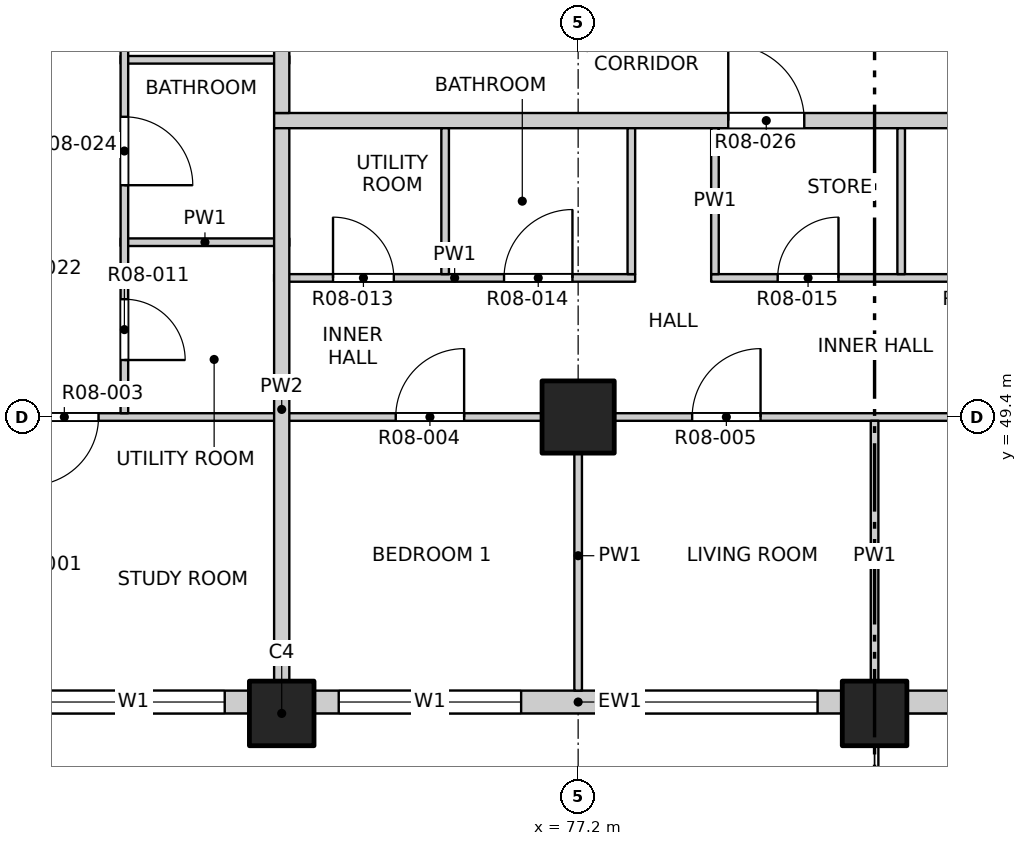
"""IFC4 building model, lengths in metres.
Left out: names, types, materials, properties, quantities, classifications, styles, units other than length and angle.
Written with IfcOpenShell. Run it as: python <this file> out.ifc"""

import sys

from ifc_helpers import new_model, si_unit, direction, frame, frame_2d, origin, origin_2d, place, context, subcontext, project, spatial, rectangle, extrude, element, fill, save


model = new_model("IFC4")
c1 = context("Model", 3, precision=1e-05, world=origin(), true_north=direction((0.0, 1.0)))
c2 = subcontext(c1, "Body", "Model", "MODEL_VIEW")
j1 = project(units=[si_unit("LENGTHUNIT", "METRE"), si_unit("PLANEANGLEUNIT", "RADIAN")], contexts=[c1])
p1 = place(None, origin())
s1 = spatial("IfcSite", under=j1, at=p1, CompositionType="ELEMENT")
p2 = place(p1, origin())
s2 = spatial("IfcBuilding", under=s1, at=p2, CompositionType="ELEMENT")
p3 = place(p2, frame((0.0, 0.0, 99.9)))
s3 = spatial("IfcBuildingStorey", under=s2, at=p3, CompositionType="ELEMENT", Elevation=99.9)
for number, where, z_axis, x_axis in (
    (1, (73.3, 45.5, -0.3), (0.0, 0.0, 1.0), (1.0, 0.0, 0.0)),
    (2, (81.1, 45.5, -0.3), (0.0, 0.0, 1.0), (1.0, 0.0, 0.0)),
):
    element("IfcColumn", number, at=place(p3, frame(where, z_axis=z_axis, x_axis=x_axis)), inside=s3, PredefinedType="COLUMN", context=c2, shape_type="SweptSolid", body=[
        extrude(rectangle(XDim=0.85, YDim=0.85, at=origin_2d()), origin(), (0.0, 0.0, 1.0), 3.45),
    ])
p4 = place(p3, frame((77.2, 49.4, -0.3), z_axis=(0.0, 0.0, 1.0), x_axis=(1.0, 0.0, 0.0)))
e3 = element("IfcColumn", 3, at=p4, inside=s3, PredefinedType="COLUMN", context=c2, shape_type="SweptSolid", body=[
    extrude(rectangle(XDim=0.95, YDim=0.95, at=origin_2d()), origin(), (0.0, 0.0, 1.0), 3.45),
])
p5 = place(p3, frame((69.4, 45.65, 0.0), z_axis=(0.0, 0.0, 1.0), x_axis=(1.0, 0.0, 0.0)))
e4 = element("IfcWall", 4, at=p5, inside=s3, PredefinedType="SOLIDWALL", context=c2, shape_type="SweptSolid", body=[
    extrude(rectangle(XDim=3.475, YDim=0.3, at=frame_2d((1.738, 0.0))), origin(), (0.0, 0.0, 1.0), 2.7),
])
p6 = place(p5, frame((0.75, 0.0, 0.9)))
e5 = element("IfcOpeningElement", 5, at=p6, cuts=e4, PredefinedType="OPENING", context=c2, shape_type="SweptSolid", body=[
    extrude(rectangle(XDim=2.4, YDim=1.8, at=frame_2d((1.2, 0.9))), frame((0.0, 0.16, 0.0), z_axis=(0.0, -1.0, 0.0), x_axis=(1.0, 0.0, 0.0)), (0.0, 0.0, 1.0), 0.32),
])
p7 = place(p3, frame((73.725, 45.65, 0.0), z_axis=(0.0, 0.0, 1.0), x_axis=(1.0, 0.0, 0.0)))
e6 = element("IfcWall", 6, at=p7, inside=s3, PredefinedType="SOLIDWALL", context=c2, shape_type="SweptSolid", body=[
    extrude(rectangle(XDim=6.95, YDim=0.3, at=frame_2d((3.475, 0.0))), origin(), (0.0, 0.0, 1.0), 2.7),
])
p8 = place(p7, frame((0.325, 0.0, 0.9)))
e7 = element("IfcOpeningElement", 7, at=p8, cuts=e6, PredefinedType="OPENING", context=c2, shape_type="SweptSolid", body=[
    extrude(rectangle(XDim=2.4, YDim=1.8, at=frame_2d((1.2, 0.9))), frame((0.0, 0.16, 0.0), z_axis=(0.0, -1.0, 0.0), x_axis=(1.0, 0.0, 0.0)), (0.0, 0.0, 1.0), 0.32),
])
p9 = place(p7, frame((4.225, 0.0, 0.9)))
e8 = element("IfcOpeningElement", 8, at=p9, cuts=e6, PredefinedType="OPENING", context=c2, shape_type="SweptSolid", body=[
    extrude(rectangle(XDim=2.4, YDim=1.8, at=frame_2d((1.2, 0.9))), frame((0.0, 0.16, 0.0), z_axis=(0.0, -1.0, 0.0), x_axis=(1.0, 0.0, 0.0)), (0.0, 0.0, 1.0), 0.32),
])
p10 = place(p3, frame((81.525, 45.65, 0.0), z_axis=(0.0, 0.0, 1.0), x_axis=(1.0, 0.0, 0.0)))
e9 = element("IfcWall", 9, at=p10, inside=s3, PredefinedType="SOLIDWALL", context=c2, shape_type="SweptSolid", body=[
    extrude(rectangle(XDim=6.95, YDim=0.3, at=frame_2d((3.475, 0.0))), origin(), (0.0, 0.0, 1.0), 2.7),
])
p11 = place(p10, frame((0.625, 0.0, 0.0)))
e10 = element("IfcOpeningElement", 10, at=p11, cuts=e9, PredefinedType="OPENING", context=c2, shape_type="SweptSolid", body=[
    extrude(rectangle(XDim=1.8, YDim=2.4, at=frame_2d((0.9, 1.2))), frame((0.0, 0.16, 0.0), z_axis=(0.0, -1.0, 0.0), x_axis=(1.0, 0.0, 0.0)), (0.0, 0.0, 1.0), 0.32),
])
p12 = place(p10, frame((4.225, 0.0, 0.9)))
e11 = element("IfcOpeningElement", 11, at=p12, cuts=e9, PredefinedType="OPENING", context=c2, shape_type="SweptSolid", body=[
    extrude(rectangle(XDim=2.4, YDim=1.8, at=frame_2d((1.2, 0.9))), frame((0.0, 0.16, 0.0), z_axis=(0.0, -1.0, 0.0), x_axis=(1.0, 0.0, 0.0)), (0.0, 0.0, 1.0), 0.32),
])
p13 = place(p3, frame((65.8, 49.4, 0.0), z_axis=(0.0, 0.0, 1.0), x_axis=(1.0, 0.0, 0.0)))
e12 = element("IfcWall", 12, at=p13, inside=s3, PredefinedType="PARTITIONING", context=c2, shape_type="SweptSolid", body=[
    extrude(rectangle(XDim=38.4, YDim=0.1, at=frame_2d((19.2, 0.0))), origin(), (0.0, 0.0, 1.0), 3.15),
])
p14 = place(p13, frame((4.19, 0.0, 0.0)))
e13 = element("IfcOpeningElement", 13, at=p14, cuts=e12, PredefinedType="OPENING", context=c2, shape_type="SweptSolid", body=[
    extrude(rectangle(XDim=0.9, YDim=2.1, at=frame_2d((0.45, 1.05))), frame((0.0, 0.06, 0.0), z_axis=(0.0, -1.0, 0.0), x_axis=(1.0, 0.0, 0.0)), (0.0, 0.0, 1.0), 0.12),
])
p15 = place(p13, frame((9.0, 0.0, 0.0)))
e14 = element("IfcOpeningElement", 14, at=p15, cuts=e12, PredefinedType="OPENING", context=c2, shape_type="SweptSolid", body=[
    extrude(rectangle(XDim=0.9, YDim=2.1, at=frame_2d((0.45, 1.05))), frame((0.0, 0.06, 0.0), z_axis=(0.0, -1.0, 0.0), x_axis=(1.0, 0.0, 0.0)), (0.0, 0.0, 1.0), 0.12),
])
p16 = place(p13, frame((12.9, 0.0, 0.0)))
e15 = element("IfcOpeningElement", 15, at=p16, cuts=e12, PredefinedType="OPENING", context=c2, shape_type="SweptSolid", body=[
    extrude(rectangle(XDim=0.9, YDim=2.1, at=frame_2d((0.45, 1.05))), frame((0.0, 0.06, 0.0), z_axis=(0.0, -1.0, 0.0), x_axis=(1.0, 0.0, 0.0)), (0.0, 0.0, 1.0), 0.12),
])
p17 = place(p13, frame((16.8, 0.0, 0.0)))
e16 = element("IfcOpeningElement", 16, at=p17, cuts=e12, PredefinedType="OPENING", context=c2, shape_type="SweptSolid", body=[
    extrude(rectangle(XDim=0.9, YDim=2.1, at=frame_2d((0.45, 1.05))), frame((0.0, 0.06, 0.0), z_axis=(0.0, -1.0, 0.0), x_axis=(1.0, 0.0, 0.0)), (0.0, 0.0, 1.0), 0.12),
])
p18 = place(p13, frame((20.7, 0.0, 0.0)))
e17 = element("IfcOpeningElement", 17, at=p18, cuts=e12, PredefinedType="OPENING", context=c2, shape_type="SweptSolid", body=[
    extrude(rectangle(XDim=0.9, YDim=2.1, at=frame_2d((0.45, 1.05))), frame((0.0, 0.06, 0.0), z_axis=(0.0, -1.0, 0.0), x_axis=(1.0, 0.0, 0.0)), (0.0, 0.0, 1.0), 0.12),
])
p19 = place(p13, frame((24.6, 0.0, 0.0)))
e18 = element("IfcOpeningElement", 18, at=p19, cuts=e12, PredefinedType="OPENING", context=c2, shape_type="SweptSolid", body=[
    extrude(rectangle(XDim=0.9, YDim=2.1, at=frame_2d((0.45, 1.05))), frame((0.0, 0.06, 0.0), z_axis=(0.0, -1.0, 0.0), x_axis=(1.0, 0.0, 0.0)), (0.0, 0.0, 1.0), 0.12),
])
p20 = place(p13, frame((28.5, 0.0, 0.0)))
e19 = element("IfcOpeningElement", 19, at=p20, cuts=e12, PredefinedType="OPENING", context=c2, shape_type="SweptSolid", body=[
    extrude(rectangle(XDim=0.9, YDim=2.1, at=frame_2d((0.45, 1.05))), frame((0.0, 0.06, 0.0), z_axis=(0.0, -1.0, 0.0), x_axis=(1.0, 0.0, 0.0)), (0.0, 0.0, 1.0), 0.12),
])
p21 = place(p13, frame((33.31, 0.0, 0.0)))
e20 = element("IfcOpeningElement", 20, at=p21, cuts=e12, PredefinedType="OPENING", context=c2, shape_type="SweptSolid", body=[
    extrude(rectangle(XDim=0.9, YDim=2.1, at=frame_2d((0.45, 1.05))), frame((0.0, 0.06, 0.0), z_axis=(0.0, -1.0, 0.0), x_axis=(1.0, 0.0, 0.0)), (0.0, 0.0, 1.0), 0.12),
])
p22 = place(p3, frame((73.2, 51.23, 0.0), z_axis=(0.0, 0.0, 1.0), x_axis=(1.0, 0.0, 0.0)))
e21 = element("IfcWall", 21, at=p22, inside=s3, PredefinedType="PARTITIONING", context=c2, shape_type="SweptSolid", body=[
    extrude(rectangle(XDim=4.75, YDim=0.1, at=frame_2d((2.375, 0.0))), origin(), (0.0, 0.0, 1.0), 3.15),
])
p23 = place(p22, frame((0.775, 0.0, 0.0)))
e22 = element("IfcOpeningElement", 22, at=p23, cuts=e21, PredefinedType="OPENING", context=c2, shape_type="SweptSolid", body=[
    extrude(rectangle(XDim=0.8, YDim=2.1, at=frame_2d((0.4, 1.05))), frame((0.0, 0.06, 0.0), z_axis=(0.0, -1.0, 0.0), x_axis=(1.0, 0.0, 0.0)), (0.0, 0.0, 1.0), 0.12),
])
p24 = place(p22, frame((3.025, 0.0, 0.0)))
e23 = element("IfcOpeningElement", 23, at=p24, cuts=e21, PredefinedType="OPENING", context=c2, shape_type="SweptSolid", body=[
    extrude(rectangle(XDim=0.9, YDim=2.1, at=frame_2d((0.45, 1.05))), frame((0.0, 0.06, 0.0), z_axis=(0.0, -1.0, 0.0), x_axis=(1.0, 0.0, 0.0)), (0.0, 0.0, 1.0), 0.12),
])
p25 = place(p3, frame((78.95, 51.23, 0.0), z_axis=(0.0, 0.0, 1.0), x_axis=(1.0, 0.0, 0.0)))
e24 = element("IfcWall", 24, at=p25, inside=s3, PredefinedType="PARTITIONING", context=c2, shape_type="SweptSolid", body=[
    extrude(rectangle(XDim=11.1, YDim=0.1, at=frame_2d((5.55, 0.0))), origin(), (0.0, 0.0, 1.0), 3.15),
])
p26 = place(p25, frame((0.875, 0.0, 0.0)))
e25 = element("IfcOpeningElement", 25, at=p26, cuts=e24, PredefinedType="OPENING", context=c2, shape_type="SweptSolid", body=[
    extrude(rectangle(XDim=0.8, YDim=2.1, at=frame_2d((0.4, 1.05))), frame((0.0, 0.06, 0.0), z_axis=(0.0, -1.0, 0.0), x_axis=(1.0, 0.0, 0.0)), (0.0, 0.0, 1.0), 0.12),
])
p27 = place(p25, frame((3.325, 0.0, 0.0)))
e26 = element("IfcOpeningElement", 26, at=p27, cuts=e24, PredefinedType="OPENING", context=c2, shape_type="SweptSolid", body=[
    extrude(rectangle(XDim=0.8, YDim=2.1, at=frame_2d((0.4, 1.05))), frame((0.0, 0.06, 0.0), z_axis=(0.0, -1.0, 0.0), x_axis=(1.0, 0.0, 0.0)), (0.0, 0.0, 1.0), 0.12),
])
p28 = place(p25, frame((6.035, 0.0, 0.0)))
e27 = element("IfcOpeningElement", 27, at=p28, cuts=e24, PredefinedType="OPENING", context=c2, shape_type="SweptSolid", body=[
    extrude(rectangle(XDim=0.9, YDim=2.1, at=frame_2d((0.45, 1.05))), frame((0.0, 0.06, 0.0), z_axis=(0.0, -1.0, 0.0), x_axis=(1.0, 0.0, 0.0)), (0.0, 0.0, 1.0), 0.12),
])
p29 = place(p25, frame((8.535, 0.0, 0.0)))
e28 = element("IfcOpeningElement", 28, at=p29, cuts=e24, PredefinedType="OPENING", context=c2, shape_type="SweptSolid", body=[
    extrude(rectangle(XDim=0.9, YDim=2.1, at=frame_2d((0.45, 1.05))), frame((0.0, 0.06, 0.0), z_axis=(0.0, -1.0, 0.0), x_axis=(1.0, 0.0, 0.0)), (0.0, 0.0, 1.0), 0.12),
])
p30 = place(p25, frame((10.1, 0.0, 0.0)))
e29 = element("IfcOpeningElement", 29, at=p30, cuts=e24, PredefinedType="OPENING", context=c2, shape_type="SweptSolid", body=[
    extrude(rectangle(XDim=0.8, YDim=2.1, at=frame_2d((0.4, 1.05))), frame((0.0, 0.06, 0.0), z_axis=(0.0, -1.0, 0.0), x_axis=(1.0, 0.0, 0.0)), (0.0, 0.0, 1.0), 0.12),
])
p31 = place(p3, frame((71.18, 51.7, 0.0), z_axis=(0.0, 0.0, 1.0), x_axis=(1.0, 0.0, 0.0)))
e30 = element("IfcWall", 30, at=p31, inside=s3, PredefinedType="PARTITIONING", context=c2, shape_type="SweptSolid", body=[
    extrude(rectangle(XDim=2.22, YDim=0.1, at=frame_2d((1.11, 0.0))), origin(), (0.0, 0.0, 1.0), 3.15),
])
p32 = place(p3, frame((73.2, 53.3, 0.0), z_axis=(0.0, 0.0, 1.0), x_axis=(1.0, 0.0, 0.0)))
e31 = element("IfcWall", 31, at=p32, inside=s3, PredefinedType="PARTITIONING", context=c2, shape_type="SweptSolid", body=[
    extrude(rectangle(XDim=23.6, YDim=0.2, at=frame_2d((11.8, 0.0))), origin(), (0.0, 0.0, 1.0), 3.15),
])
p33 = place(p32, frame((5.975, 0.0, 0.0)))
e32 = element("IfcOpeningElement", 32, at=p33, cuts=e31, PredefinedType="OPENING", context=c2, shape_type="SweptSolid", body=[
    extrude(rectangle(XDim=1.0, YDim=2.1, at=frame_2d((0.5, 1.05))), frame((0.0, 0.11, 0.0), z_axis=(0.0, -1.0, 0.0), x_axis=(1.0, 0.0, 0.0)), (0.0, 0.0, 1.0), 0.22),
])
p34 = place(p32, frame((18.075, 0.0, 0.0)))
e33 = element("IfcOpeningElement", 33, at=p34, cuts=e31, PredefinedType="OPENING", context=c2, shape_type="SweptSolid", body=[
    extrude(rectangle(XDim=1.0, YDim=2.1, at=frame_2d((0.5, 1.05))), frame((0.0, 0.11, 0.0), z_axis=(0.0, -1.0, 0.0), x_axis=(1.0, 0.0, 0.0)), (0.0, 0.0, 1.0), 0.22),
])
p35 = place(p3, frame((71.18, 54.1, 0.0), z_axis=(0.0, 0.0, 1.0), x_axis=(1.0, 0.0, 0.0)))
e34 = element("IfcWall", 34, at=p35, inside=s3, PredefinedType="PARTITIONING", context=c2, shape_type="SweptSolid", body=[
    extrude(rectangle(XDim=2.22, YDim=0.1, at=frame_2d((1.11, 0.0))), origin(), (0.0, 0.0, 1.0), 3.15),
])
p36 = place(p3, frame((71.23, 49.45, 0.0), z_axis=(0.0, 0.0, 1.0), x_axis=(0.0, 1.0, 0.0)))
e35 = element("IfcWall", 35, at=p36, inside=s3, PredefinedType="PARTITIONING", context=c2, shape_type="SweptSolid", body=[
    extrude(rectangle(XDim=9.05, YDim=0.1, at=frame_2d((4.525, 0.0))), origin(), (0.0, 0.0, 1.0), 3.15),
])
p37 = place(p36, frame((0.7, 0.0, 0.0)))
e36 = element("IfcOpeningElement", 36, at=p37, cuts=e35, PredefinedType="OPENING", context=c2, shape_type="SweptSolid", body=[
    extrude(rectangle(XDim=0.8, YDim=2.1, at=frame_2d((0.4, 1.05))), frame((0.0, 0.06, 0.0), z_axis=(0.0, -1.0, 0.0), x_axis=(1.0, 0.0, 0.0)), (0.0, 0.0, 1.0), 0.12),
])
p38 = place(p36, frame((3.0, 0.0, 0.0)))
e37 = element("IfcOpeningElement", 37, at=p38, cuts=e35, PredefinedType="OPENING", context=c2, shape_type="SweptSolid", body=[
    extrude(rectangle(XDim=0.9, YDim=2.1, at=frame_2d((0.45, 1.05))), frame((0.0, 0.06, 0.0), z_axis=(0.0, -1.0, 0.0), x_axis=(1.0, 0.0, 0.0)), (0.0, 0.0, 1.0), 0.12),
])
p39 = place(p36, frame((5.575, 0.0, 0.0)))
e38 = element("IfcOpeningElement", 38, at=p39, cuts=e35, PredefinedType="OPENING", context=c2, shape_type="SweptSolid", body=[
    extrude(rectangle(XDim=0.8, YDim=2.1, at=frame_2d((0.4, 1.05))), frame((0.0, 0.06, 0.0), z_axis=(0.0, -1.0, 0.0), x_axis=(1.0, 0.0, 0.0)), (0.0, 0.0, 1.0), 0.12),
])
p40 = place(p36, frame((7.75, 0.0, 0.0)))
e39 = element("IfcOpeningElement", 39, at=p40, cuts=e35, PredefinedType="OPENING", context=c2, shape_type="SweptSolid", body=[
    extrude(rectangle(XDim=0.9, YDim=2.1, at=frame_2d((0.45, 1.05))), frame((0.0, 0.06, 0.0), z_axis=(0.0, -1.0, 0.0), x_axis=(1.0, 0.0, 0.0)), (0.0, 0.0, 1.0), 0.12),
])
p41 = place(p3, frame((73.3, 45.8, 0.0), z_axis=(0.0, 0.0, 1.0), x_axis=(0.0, 1.0, 0.0)))
e40 = element("IfcWall", 40, at=p41, inside=s3, PredefinedType="PARTITIONING", context=c2, shape_type="SweptSolid", body=[
    extrude(rectangle(XDim=7.4, YDim=0.2, at=frame_2d((3.7, 0.0))), origin(), (0.0, 0.0, 1.0), 3.15),
])
p42 = place(p3, frame((73.3, 53.4, 0.0), z_axis=(0.0, 0.0, 1.0), x_axis=(0.0, 1.0, 0.0)))
e41 = element("IfcWall", 41, at=p42, inside=s3, PredefinedType="PARTITIONING", context=c2, shape_type="SweptSolid", body=[
    extrude(rectangle(XDim=30.8, YDim=0.2, at=frame_2d((15.4, 0.0))), origin(), (0.0, 0.0, 1.0), 3.15),
])
p43 = place(p42, frame((6.425, 0.0, 0.0)))
e42 = element("IfcOpeningElement", 42, at=p43, cuts=e41, PredefinedType="OPENING", context=c2, shape_type="SweptSolid", body=[
    extrude(rectangle(XDim=1.0, YDim=2.1, at=frame_2d((0.5, 1.05))), frame((0.0, 0.11, 0.0), z_axis=(0.0, -1.0, 0.0), x_axis=(1.0, 0.0, 0.0)), (0.0, 0.0, 1.0), 0.22),
])
p44 = place(p42, frame((18.525, 0.0, 0.0)))
e43 = element("IfcOpeningElement", 43, at=p44, cuts=e41, PredefinedType="OPENING", context=c2, shape_type="SweptSolid", body=[
    extrude(rectangle(XDim=1.0, YDim=2.1, at=frame_2d((0.5, 1.05))), frame((0.0, 0.11, 0.0), z_axis=(0.0, -1.0, 0.0), x_axis=(1.0, 0.0, 0.0)), (0.0, 0.0, 1.0), 0.22),
])
p45 = place(p3, frame((75.45, 51.28, 0.0), z_axis=(0.0, 0.0, 1.0), x_axis=(0.0, 1.0, 0.0)))
e44 = element("IfcWall", 44, at=p45, inside=s3, PredefinedType="PARTITIONING", context=c2, shape_type="SweptSolid", body=[
    extrude(rectangle(XDim=1.92, YDim=0.1, at=frame_2d((0.96, 0.0))), origin(), (0.0, 0.0, 1.0), 3.15),
])
p46 = place(p3, frame((77.2, 45.8, 0.0), z_axis=(0.0, 0.0, 1.0), x_axis=(0.0, 1.0, 0.0)))
e45 = element("IfcWall", 45, at=p46, inside=s3, PredefinedType="PARTITIONING", context=c2, shape_type="SweptSolid", body=[
    extrude(rectangle(XDim=3.55, YDim=0.1, at=frame_2d((1.775, 0.0))), origin(), (0.0, 0.0, 1.0), 3.15),
])
for number, where, z_axis, x_axis in (
    (46, (77.9, 51.28, 0.0), (0.0, 0.0, 1.0), (0.0, 1.0, 0.0)),
    (47, (79.0, 51.28, 0.0), (0.0, 0.0, 1.0), (0.0, 1.0, 0.0)),
):
    element("IfcWall", number, at=place(p3, frame(where, z_axis=z_axis, x_axis=x_axis)), inside=s3, PredefinedType="PARTITIONING", context=c2, shape_type="SweptSolid", body=[
        extrude(rectangle(XDim=1.92, YDim=0.1, at=frame_2d((0.96, 0.0))), origin(), (0.0, 0.0, 1.0), 3.15),
    ])
p47 = place(p3, frame((81.1, 45.8, 0.0), z_axis=(0.0, 0.0, 1.0), x_axis=(0.0, 1.0, 0.0)))
e48 = element("IfcWall", 48, at=p47, inside=s3, PredefinedType="PARTITIONING", context=c2, shape_type="SweptSolid", body=[
    extrude(rectangle(XDim=3.55, YDim=0.1, at=frame_2d((1.775, 0.0))), origin(), (0.0, 0.0, 1.0), 2.55),
])
p48 = place(p3, frame((81.45, 51.28, 0.0), z_axis=(0.0, 0.0, 1.0), x_axis=(0.0, 1.0, 0.0)))
e49 = element("IfcWall", 49, at=p48, inside=s3, PredefinedType="PARTITIONING", context=c2, shape_type="SweptSolid", body=[
    extrude(rectangle(XDim=1.92, YDim=0.1, at=frame_2d((0.96, 0.0))), origin(), (0.0, 0.0, 1.0), 3.15),
])
p49 = place(p6, origin())
e50 = element("IfcWindow", 50, at=p49, inside=s3, PartitioningType="DOUBLE_PANEL_VERTICAL", PredefinedType="WINDOW", context=c2, shape_type="SweptSolid", body=[
    extrude(rectangle(XDim=2.4, YDim=1.8, at=frame_2d((1.2, 0.9))), frame((0.0, 0.03, 0.0), z_axis=(0.0, -1.0, 0.0), x_axis=(1.0, 0.0, 0.0)), (0.0, 0.0, 1.0), 0.06),
])
fill(e5, e50)
p50 = place(p8, origin())
e51 = element("IfcWindow", 51, at=p50, inside=s3, PartitioningType="DOUBLE_PANEL_VERTICAL", PredefinedType="WINDOW", context=c2, shape_type="SweptSolid", body=[
    extrude(rectangle(XDim=2.4, YDim=1.8, at=frame_2d((1.2, 0.9))), frame((0.0, 0.03, 0.0), z_axis=(0.0, -1.0, 0.0), x_axis=(1.0, 0.0, 0.0)), (0.0, 0.0, 1.0), 0.06),
])
fill(e7, e51)
p51 = place(p9, origin())
e52 = element("IfcWindow", 52, at=p51, inside=s3, PartitioningType="DOUBLE_PANEL_VERTICAL", PredefinedType="WINDOW", context=c2, shape_type="SweptSolid", body=[
    extrude(rectangle(XDim=2.4, YDim=1.8, at=frame_2d((1.2, 0.9))), frame((0.0, 0.03, 0.0), z_axis=(0.0, -1.0, 0.0), x_axis=(1.0, 0.0, 0.0)), (0.0, 0.0, 1.0), 0.06),
])
fill(e8, e52)
p52 = place(p14, origin())
e53 = element("IfcDoor", 53, at=p52, inside=s3, OperationType="SINGLE_SWING_RIGHT", PredefinedType="DOOR", context=c2, shape_type="SweptSolid", body=[
    extrude(rectangle(XDim=0.9, YDim=2.1, at=frame_2d((0.45, 1.05))), frame((0.0, 0.025, 0.0), z_axis=(0.0, -1.0, 0.0), x_axis=(1.0, 0.0, 0.0)), (0.0, 0.0, 1.0), 0.05),
])
fill(e13, e53)
p53 = place(p15, origin())
e54 = element("IfcDoor", 54, at=p53, inside=s3, OperationType="SINGLE_SWING_RIGHT", PredefinedType="DOOR", context=c2, shape_type="SweptSolid", body=[
    extrude(rectangle(XDim=0.9, YDim=2.1, at=frame_2d((0.45, 1.05))), frame((0.0, 0.025, 0.0), z_axis=(0.0, -1.0, 0.0), x_axis=(1.0, 0.0, 0.0)), (0.0, 0.0, 1.0), 0.05),
])
fill(e14, e54)
p54 = place(p16, origin())
e55 = element("IfcDoor", 55, at=p54, inside=s3, OperationType="SINGLE_SWING_RIGHT", PredefinedType="DOOR", context=c2, shape_type="SweptSolid", body=[
    extrude(rectangle(XDim=0.9, YDim=2.1, at=frame_2d((0.45, 1.05))), frame((0.0, 0.025, 0.0), z_axis=(0.0, -1.0, 0.0), x_axis=(1.0, 0.0, 0.0)), (0.0, 0.0, 1.0), 0.05),
])
fill(e15, e55)
p55 = place(p37, origin())
e56 = element("IfcDoor", 56, at=p55, inside=s3, OperationType="SINGLE_SWING_RIGHT", PredefinedType="DOOR", context=c2, shape_type="SweptSolid", body=[
    extrude(rectangle(XDim=0.8, YDim=2.1, at=frame_2d((0.4, 1.05))), frame((0.0, 0.025, 0.0), z_axis=(0.0, -1.0, 0.0), x_axis=(1.0, 0.0, 0.0)), (0.0, 0.0, 1.0), 0.05),
])
fill(e36, e56)
p56 = place(p23, origin())
e57 = element("IfcDoor", 57, at=p56, inside=s3, OperationType="SINGLE_SWING_LEFT", PredefinedType="DOOR", context=c2, shape_type="SweptSolid", body=[
    extrude(rectangle(XDim=0.8, YDim=2.1, at=frame_2d((0.4, 1.05))), frame((0.0, 0.025, 0.0), z_axis=(0.0, -1.0, 0.0), x_axis=(1.0, 0.0, 0.0)), (0.0, 0.0, 1.0), 0.05),
])
fill(e22, e57)
p57 = place(p24, origin())
e58 = element("IfcDoor", 58, at=p57, inside=s3, OperationType="SINGLE_SWING_RIGHT", PredefinedType="DOOR", context=c2, shape_type="SweptSolid", body=[
    extrude(rectangle(XDim=0.9, YDim=2.1, at=frame_2d((0.45, 1.05))), frame((0.0, 0.025, 0.0), z_axis=(0.0, -1.0, 0.0), x_axis=(1.0, 0.0, 0.0)), (0.0, 0.0, 1.0), 0.05),
])
fill(e23, e58)
p58 = place(p26, origin())
e59 = element("IfcDoor", 59, at=p58, inside=s3, OperationType="SINGLE_SWING_RIGHT", PredefinedType="DOOR", context=c2, shape_type="SweptSolid", body=[
    extrude(rectangle(XDim=0.8, YDim=2.1, at=frame_2d((0.4, 1.05))), frame((0.0, 0.025, 0.0), z_axis=(0.0, -1.0, 0.0), x_axis=(1.0, 0.0, 0.0)), (0.0, 0.0, 1.0), 0.05),
])
fill(e25, e59)
p59 = place(p38, origin())
e60 = element("IfcDoor", 60, at=p59, inside=s3, OperationType="SINGLE_SWING_RIGHT", PredefinedType="DOOR", context=c2, shape_type="SweptSolid", body=[
    extrude(rectangle(XDim=0.9, YDim=2.1, at=frame_2d((0.45, 1.05))), frame((0.0, 0.025, 0.0), z_axis=(0.0, -1.0, 0.0), x_axis=(1.0, 0.0, 0.0)), (0.0, 0.0, 1.0), 0.05),
])
fill(e37, e60)
p60 = place(p33, origin())
e61 = element("IfcDoor", 61, at=p60, inside=s3, OperationType="SINGLE_SWING_LEFT", PredefinedType="DOOR", context=c2, shape_type="SweptSolid", body=[
    extrude(rectangle(XDim=1.0, YDim=2.1, at=frame_2d((0.5, 1.05))), frame((0.0, 0.025, 0.0), z_axis=(0.0, -1.0, 0.0), x_axis=(1.0, 0.0, 0.0)), (0.0, 0.0, 1.0), 0.05),
])
fill(e32, e61)
save(model, sys.argv[1])
